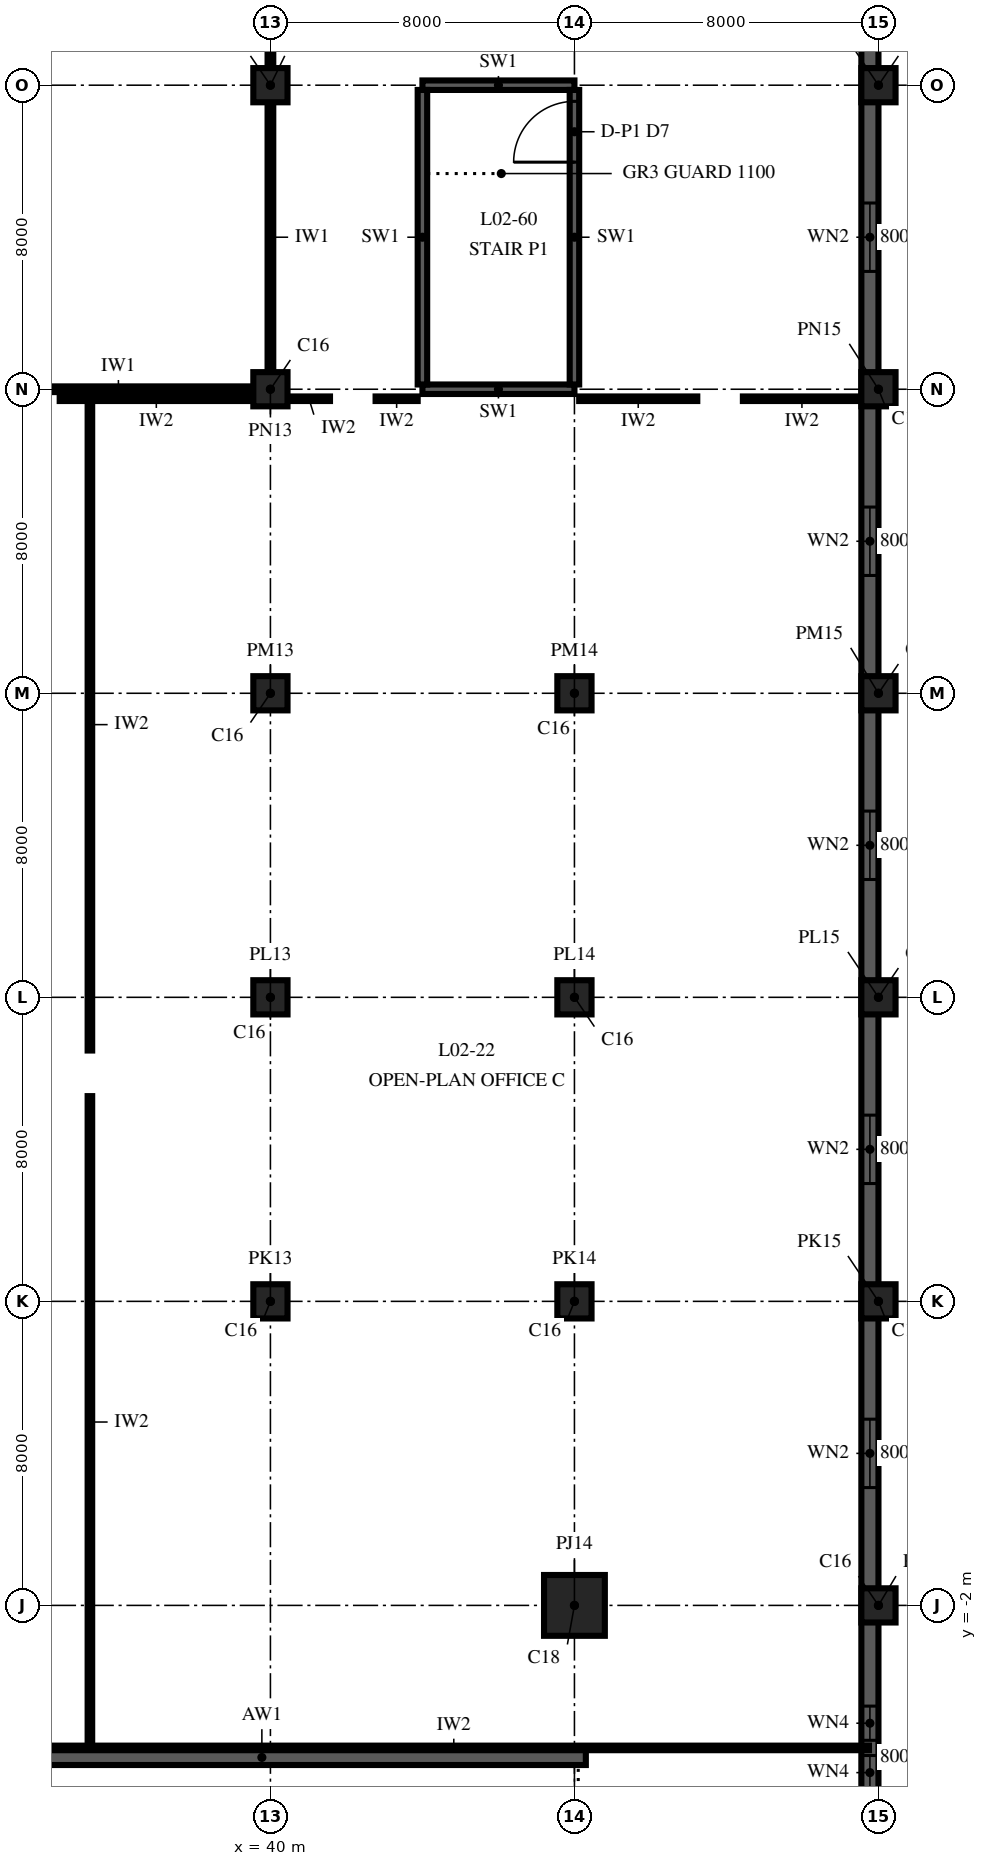
"""IFC4 building model, lengths in metres.
Left out: names, types, materials, properties, quantities, classifications, styles, units other than length and angle.
Written with IfcOpenShell. Run it as: python <this file> out.ifc"""

import sys

from ifc_helpers import new_model, si_unit, direction, frame, frame_2d, origin, origin_2d, place, context, subcontext, project, spatial, rectangle, extrude, element, fill, save


model = new_model("IFC4")
c1 = context("Model", 3, precision=1e-05, world=origin(), true_north=direction((0.0, 1.0)))
c2 = subcontext(c1, "Body", "Model", "MODEL_VIEW")
j1 = project(units=[si_unit("LENGTHUNIT", "METRE"), si_unit("PLANEANGLEUNIT", "RADIAN")], contexts=[c1])
p1 = place(None, origin())
s1 = spatial("IfcSite", under=j1, at=p1, CompositionType="ELEMENT")
p2 = place(p1, origin())
s2 = spatial("IfcBuilding", under=s1, at=p2, CompositionType="ELEMENT")
p3 = place(p2, frame((0.0, 0.0, 12.0)))
s3 = spatial("IfcBuildingStorey", under=s2, at=p3, CompositionType="ELEMENT", Elevation=12.0)
for number, where, z_axis, x_axis in (
    (1, (40.0, 6.0, 0.0), (0.0, 0.0, 1.0), (1.0, 0.0, 0.0)),
    (2, (40.0, 14.0, 0.0), (0.0, 0.0, 1.0), (1.0, 0.0, 0.0)),
    (3, (40.0, 22.0, 0.0), (0.0, 0.0, 1.0), (1.0, 0.0, 0.0)),
    (4, (40.0, 30.0, 0.0), (0.0, 0.0, 1.0), (1.0, 0.0, 0.0)),
    (5, (40.0, 38.0, 0.0), (0.0, 0.0, 1.0), (1.0, 0.0, 0.0)),
):
    element("IfcColumn", number, at=place(p3, frame(where, z_axis=z_axis, x_axis=x_axis)), inside=s3, PredefinedType="COLUMN", context=c2, shape_type="SweptSolid", body=[
        extrude(rectangle(XDim=0.9, YDim=0.9, at=origin_2d()), origin(), (0.0, 0.0, 1.0), 7.0),
    ])
p4 = place(p3, frame((48.0, -2.0, 0.0), z_axis=(0.0, 0.0, 1.0), x_axis=(1.0, 0.0, 0.0)))
e6 = element("IfcColumn", 6, at=p4, inside=s3, PredefinedType="COLUMN", context=c2, shape_type="SweptSolid", body=[
    extrude(rectangle(XDim=1.6, YDim=1.6, at=origin_2d()), origin(), (0.0, 0.0, 1.0), 7.0),
])
for number, where, z_axis, x_axis in (
    (7, (48.0, 6.0, 0.0), (0.0, 0.0, 1.0), (1.0, 0.0, 0.0)),
    (8, (48.0, 14.0, 0.0), (0.0, 0.0, 1.0), (1.0, 0.0, 0.0)),
    (9, (48.0, 22.0, 0.0), (0.0, 0.0, 1.0), (1.0, 0.0, 0.0)),
    (10, (56.0, -2.0, 0.0), (0.0, 0.0, 1.0), (1.0, 0.0, 0.0)),
    (11, (56.0, 6.0, 0.0), (0.0, 0.0, 1.0), (1.0, 0.0, 0.0)),
    (12, (56.0, 14.0, 0.0), (0.0, 0.0, 1.0), (1.0, 0.0, 0.0)),
    (13, (56.0, 22.0, 0.0), (0.0, 0.0, 1.0), (1.0, 0.0, 0.0)),
    (14, (56.0, 30.0, 0.0), (0.0, 0.0, 1.0), (1.0, 0.0, 0.0)),
    (15, (56.0, 38.0, 0.0), (0.0, 0.0, 1.0), (1.0, 0.0, 0.0)),
):
    element("IfcColumn", number, at=place(p3, frame(where, z_axis=z_axis, x_axis=x_axis)), inside=s3, PredefinedType="COLUMN", context=c2, shape_type="SweptSolid", body=[
        extrude(rectangle(XDim=0.9, YDim=0.9, at=origin_2d()), origin(), (0.0, 0.0, 1.0), 7.0),
    ])
p5 = place(p3, frame((31.25, -6.0, 0.0), z_axis=(0.0, 0.0, 1.0), x_axis=(1.0, 0.0, 0.0)))
e16 = element("IfcWall", 16, at=p5, inside=s3, PredefinedType="SHEAR", context=c2, shape_type="SweptSolid", body=[
    extrude(rectangle(XDim=17.05, YDim=0.4, at=frame_2d((8.525, 0.0))), origin(), (0.0, 0.0, 1.0), 7.0),
])
p6 = place(p3, frame((55.775, -73.55, 0.0), z_axis=(0.0, 0.0, 1.0), x_axis=(0.0, 1.0, 0.0)))
e17 = element("IfcWall", 17, at=p6, inside=s3, PredefinedType="SOLIDWALL", context=c2, shape_type="SweptSolid", body=[
    extrude(rectangle(XDim=119.1, YDim=0.45, at=frame_2d((59.55, 0.0))), origin(), (0.0, 0.0, 1.0), 7.0),
])
p7 = place(p6, frame((2.875, 0.0, 1.0)))
e18 = element("IfcOpeningElement", 18, at=p7, cuts=e17, PredefinedType="OPENING", context=c2, shape_type="SweptSolid", body=[
    extrude(rectangle(XDim=1.8, YDim=3.0, at=frame_2d((0.9, 1.5))), frame((0.0, 0.24, 0.0), z_axis=(0.0, -1.0, 0.0), x_axis=(1.0, 0.0, 0.0)), (0.0, 0.0, 1.0), 0.48),
])
p8 = place(p6, frame((10.65, 0.0, 1.0)))
e19 = element("IfcOpeningElement", 19, at=p8, cuts=e17, PredefinedType="OPENING", context=c2, shape_type="SweptSolid", body=[
    extrude(rectangle(XDim=1.8, YDim=3.0, at=frame_2d((0.9, 1.5))), frame((0.0, 0.24, 0.0), z_axis=(0.0, -1.0, 0.0), x_axis=(1.0, 0.0, 0.0)), (0.0, 0.0, 1.0), 0.48),
])
p9 = place(p6, frame((18.65, 0.0, 1.0)))
e20 = element("IfcOpeningElement", 20, at=p9, cuts=e17, PredefinedType="OPENING", context=c2, shape_type="SweptSolid", body=[
    extrude(rectangle(XDim=1.8, YDim=3.0, at=frame_2d((0.9, 1.5))), frame((0.0, 0.24, 0.0), z_axis=(0.0, -1.0, 0.0), x_axis=(1.0, 0.0, 0.0)), (0.0, 0.0, 1.0), 0.48),
])
p10 = place(p6, frame((26.65, 0.0, 1.0)))
e21 = element("IfcOpeningElement", 21, at=p10, cuts=e17, PredefinedType="OPENING", context=c2, shape_type="SweptSolid", body=[
    extrude(rectangle(XDim=1.8, YDim=3.0, at=frame_2d((0.9, 1.5))), frame((0.0, 0.24, 0.0), z_axis=(0.0, -1.0, 0.0), x_axis=(1.0, 0.0, 0.0)), (0.0, 0.0, 1.0), 0.48),
])
p11 = place(p6, frame((34.65, 0.0, 1.0)))
e22 = element("IfcOpeningElement", 22, at=p11, cuts=e17, PredefinedType="OPENING", context=c2, shape_type="SweptSolid", body=[
    extrude(rectangle(XDim=1.8, YDim=3.0, at=frame_2d((0.9, 1.5))), frame((0.0, 0.24, 0.0), z_axis=(0.0, -1.0, 0.0), x_axis=(1.0, 0.0, 0.0)), (0.0, 0.0, 1.0), 0.48),
])
p12 = place(p6, frame((42.65, 0.0, 1.0)))
e23 = element("IfcOpeningElement", 23, at=p12, cuts=e17, PredefinedType="OPENING", context=c2, shape_type="SweptSolid", body=[
    extrude(rectangle(XDim=1.8, YDim=3.0, at=frame_2d((0.9, 1.5))), frame((0.0, 0.24, 0.0), z_axis=(0.0, -1.0, 0.0), x_axis=(1.0, 0.0, 0.0)), (0.0, 0.0, 1.0), 0.48),
])
p13 = place(p6, frame((50.65, 0.0, 1.0)))
e24 = element("IfcOpeningElement", 24, at=p13, cuts=e17, PredefinedType="OPENING", context=c2, shape_type="SweptSolid", body=[
    extrude(rectangle(XDim=1.8, YDim=3.0, at=frame_2d((0.9, 1.5))), frame((0.0, 0.24, 0.0), z_axis=(0.0, -1.0, 0.0), x_axis=(1.0, 0.0, 0.0)), (0.0, 0.0, 1.0), 0.48),
])
p14 = place(p6, frame((58.45, 0.0, 1.0)))
e25 = element("IfcOpeningElement", 25, at=p14, cuts=e17, PredefinedType="OPENING", context=c2, shape_type="SweptSolid", body=[
    extrude(rectangle(XDim=0.9, YDim=3.0, at=frame_2d((0.45, 1.5))), frame((0.0, 0.24, 0.0), z_axis=(0.0, -1.0, 0.0), x_axis=(1.0, 0.0, 0.0)), (0.0, 0.0, 1.0), 0.48),
])
p15 = place(p6, frame((59.75, 0.0, 1.0)))
e26 = element("IfcOpeningElement", 26, at=p15, cuts=e17, PredefinedType="OPENING", context=c2, shape_type="SweptSolid", body=[
    extrude(rectangle(XDim=0.9, YDim=3.0, at=frame_2d((0.45, 1.5))), frame((0.0, 0.24, 0.0), z_axis=(0.0, -1.0, 0.0), x_axis=(1.0, 0.0, 0.0)), (0.0, 0.0, 1.0), 0.48),
])
p16 = place(p6, frame((66.7, 0.0, 1.0)))
e27 = element("IfcOpeningElement", 27, at=p16, cuts=e17, PredefinedType="OPENING", context=c2, shape_type="SweptSolid", body=[
    extrude(rectangle(XDim=0.9, YDim=3.0, at=frame_2d((0.45, 1.5))), frame((0.0, 0.24, 0.0), z_axis=(0.0, -1.0, 0.0), x_axis=(1.0, 0.0, 0.0)), (0.0, 0.0, 1.0), 0.48),
])
p17 = place(p6, frame((68.0, 0.0, 1.0)))
e28 = element("IfcOpeningElement", 28, at=p17, cuts=e17, PredefinedType="OPENING", context=c2, shape_type="SweptSolid", body=[
    extrude(rectangle(XDim=0.9, YDim=3.0, at=frame_2d((0.45, 1.5))), frame((0.0, 0.24, 0.0), z_axis=(0.0, -1.0, 0.0), x_axis=(1.0, 0.0, 0.0)), (0.0, 0.0, 1.0), 0.48),
])
p18 = place(p6, frame((74.65, 0.0, 1.0)))
e29 = element("IfcOpeningElement", 29, at=p18, cuts=e17, PredefinedType="OPENING", context=c2, shape_type="SweptSolid", body=[
    extrude(rectangle(XDim=1.8, YDim=3.0, at=frame_2d((0.9, 1.5))), frame((0.0, 0.24, 0.0), z_axis=(0.0, -1.0, 0.0), x_axis=(1.0, 0.0, 0.0)), (0.0, 0.0, 1.0), 0.48),
])
p19 = place(p6, frame((82.65, 0.0, 1.0)))
e30 = element("IfcOpeningElement", 30, at=p19, cuts=e17, PredefinedType="OPENING", context=c2, shape_type="SweptSolid", body=[
    extrude(rectangle(XDim=1.8, YDim=3.0, at=frame_2d((0.9, 1.5))), frame((0.0, 0.24, 0.0), z_axis=(0.0, -1.0, 0.0), x_axis=(1.0, 0.0, 0.0)), (0.0, 0.0, 1.0), 0.48),
])
p20 = place(p6, frame((90.65, 0.0, 1.0)))
e31 = element("IfcOpeningElement", 31, at=p20, cuts=e17, PredefinedType="OPENING", context=c2, shape_type="SweptSolid", body=[
    extrude(rectangle(XDim=1.8, YDim=3.0, at=frame_2d((0.9, 1.5))), frame((0.0, 0.24, 0.0), z_axis=(0.0, -1.0, 0.0), x_axis=(1.0, 0.0, 0.0)), (0.0, 0.0, 1.0), 0.48),
])
p21 = place(p6, frame((98.65, 0.0, 1.0)))
e32 = element("IfcOpeningElement", 32, at=p21, cuts=e17, PredefinedType="OPENING", context=c2, shape_type="SweptSolid", body=[
    extrude(rectangle(XDim=1.8, YDim=3.0, at=frame_2d((0.9, 1.5))), frame((0.0, 0.24, 0.0), z_axis=(0.0, -1.0, 0.0), x_axis=(1.0, 0.0, 0.0)), (0.0, 0.0, 1.0), 0.48),
])
p22 = place(p6, frame((106.65, 0.0, 1.0)))
e33 = element("IfcOpeningElement", 33, at=p22, cuts=e17, PredefinedType="OPENING", context=c2, shape_type="SweptSolid", body=[
    extrude(rectangle(XDim=1.8, YDim=3.0, at=frame_2d((0.9, 1.5))), frame((0.0, 0.24, 0.0), z_axis=(0.0, -1.0, 0.0), x_axis=(1.0, 0.0, 0.0)), (0.0, 0.0, 1.0), 0.48),
])
p23 = place(p6, frame((114.425, 0.0, 1.0)))
e34 = element("IfcOpeningElement", 34, at=p23, cuts=e17, PredefinedType="OPENING", context=c2, shape_type="SweptSolid", body=[
    extrude(rectangle(XDim=1.8, YDim=3.0, at=frame_2d((0.9, 1.5))), frame((0.0, 0.24, 0.0), z_axis=(0.0, -1.0, 0.0), x_axis=(1.0, 0.0, 0.0)), (0.0, 0.0, 1.0), 0.48),
])
for number, where, z_axis, x_axis in (
    (35, (44.0, 30.0, 0.0), (0.0, 0.0, 1.0), (1.0, 0.0, 0.0)),
    (36, (48.0, 38.0, 0.0), (0.0, 0.0, 1.0), (-1.0, 0.0, 0.0)),
):
    element("IfcWall", number, at=place(p3, frame(where, z_axis=z_axis, x_axis=x_axis)), inside=s3, PredefinedType="SOLIDWALL", context=c2, shape_type="SweptSolid", body=[
        extrude(rectangle(XDim=4.0, YDim=0.25, at=frame_2d((2.0, 0.0))), origin(), (0.0, 0.0, 1.0), 7.0),
    ])
p24 = place(p3, frame((48.0, 30.125, 0.0), z_axis=(0.0, 0.0, 1.0), x_axis=(0.0, 1.0, 0.0)))
e37 = element("IfcWall", 37, at=p24, inside=s3, PredefinedType="SOLIDWALL", context=c2, shape_type="SweptSolid", body=[
    extrude(rectangle(XDim=7.75, YDim=0.25, at=frame_2d((3.875, 0.0))), origin(), (0.0, 0.0, 1.0), 7.0),
])
p25 = place(p24, frame((5.85, 0.0, 0.0)))
e38 = element("IfcOpeningElement", 38, at=p25, cuts=e37, PredefinedType="OPENING", context=c2, shape_type="SweptSolid", body=[
    extrude(rectangle(XDim=1.6, YDim=2.1, at=frame_2d((0.8, 1.05))), frame((0.0, 0.14, 0.0), z_axis=(0.0, -1.0, 0.0), x_axis=(1.0, 0.0, 0.0)), (0.0, 0.0, 1.0), 0.28),
])
p26 = place(p3, frame((44.0, 37.875, 0.0), z_axis=(0.0, 0.0, 1.0), x_axis=(0.0, -1.0, 0.0)))
e39 = element("IfcWall", 39, at=p26, inside=s3, PredefinedType="SOLIDWALL", context=c2, shape_type="SweptSolid", body=[
    extrude(rectangle(XDim=7.75, YDim=0.25, at=frame_2d((3.875, 0.0))), origin(), (0.0, 0.0, 1.0), 7.0),
])
for number, where, z_axis, x_axis in (
    (40, (35.25, -5.75, 0.0), (0.0, 0.0, 1.0), (0.0, 1.0, 0.0)),
    (41, (35.25, 12.6, 0.0), (0.0, 0.0, 1.0), (0.0, 1.0, 0.0)),
):
    element("IfcWall", number, at=place(p3, frame(where, z_axis=z_axis, x_axis=x_axis)), inside=s3, PredefinedType="PARTITIONING", context=c2, shape_type="SweptSolid", body=[
        extrude(rectangle(XDim=17.15, YDim=0.12, at=frame_2d((8.575, 0.0))), origin(), (0.0, 0.0, 1.0), 6.7),
    ])
for number, where, z_axis, x_axis in (
    (42, (40.0, 30.46, 0.0), (0.0, 0.0, 1.0), (0.0, 1.0, 0.0)),
    (43, (40.0, 38.46, 0.0), (0.0, 0.0, 1.0), (0.0, 1.0, 0.0)),
):
    element("IfcWall", number, at=place(p3, frame(where, z_axis=z_axis, x_axis=x_axis)), inside=s3, PredefinedType="PARTITIONING", context=c2, shape_type="SweptSolid", body=[
        extrude(rectangle(XDim=7.08, YDim=0.15, at=frame_2d((3.54, 0.0))), origin(), (0.0, 0.0, 1.0), 6.05),
    ])
p27 = place(p3, frame((33.9, -5.75, 0.0), z_axis=(0.0, 0.0, 1.0), x_axis=(1.0, 0.0, 0.0)))
e44 = element("IfcWall", 44, at=p27, inside=s3, PredefinedType="PARTITIONING", context=c2, shape_type="SweptSolid", body=[
    extrude(rectangle(XDim=21.85, YDim=0.12, at=frame_2d((10.925, 0.0))), origin(), (0.0, 0.0, 1.0), 6.7),
])
p28 = place(p3, frame((34.455, 29.75, 0.0), z_axis=(0.0, 0.0, 1.0), x_axis=(1.0, 0.0, 0.0)))
e45 = element("IfcWall", 45, at=p28, inside=s3, PredefinedType="PARTITIONING", context=c2, shape_type="SweptSolid", body=[
    extrude(rectangle(XDim=5.085, YDim=0.12, at=frame_2d((2.542, 0.0))), origin(), (0.0, 0.0, 1.0), 6.05),
])
for number, where, z_axis, x_axis in (
    (46, (40.46, 29.75, 0.0), (0.0, 0.0, 1.0), (1.0, 0.0, 0.0)),
    (47, (42.768, 29.75, 0.0), (0.0, 0.0, 1.0), (1.0, 0.0, 0.0)),
):
    element("IfcWall", number, at=place(p3, frame(where, z_axis=z_axis, x_axis=x_axis)), inside=s3, PredefinedType="PARTITIONING", context=c2, shape_type="SweptSolid", body=[
        extrude(rectangle(XDim=1.107, YDim=0.12, at=frame_2d((0.554, 0.0))), origin(), (0.0, 0.0, 1.0), 6.7),
    ])
for number, where, z_axis, x_axis in (
    (48, (48.125, 29.75, 0.0), (0.0, 0.0, 1.0), (1.0, 0.0, 0.0)),
    (49, (52.433, 29.75, 0.0), (0.0, 0.0, 1.0), (1.0, 0.0, 0.0)),
):
    element("IfcWall", number, at=place(p3, frame(where, z_axis=z_axis, x_axis=x_axis)), inside=s3, PredefinedType="PARTITIONING", context=c2, shape_type="SweptSolid", body=[
        extrude(rectangle(XDim=3.107, YDim=0.12, at=frame_2d((1.554, 0.0))), origin(), (0.0, 0.0, 1.0), 6.7),
    ])
p29 = place(p3, frame((32.46, 30.0, 0.0), z_axis=(0.0, 0.0, 1.0), x_axis=(1.0, 0.0, 0.0)))
e50 = element("IfcWall", 50, at=p29, inside=s3, PredefinedType="PARTITIONING", context=c2, shape_type="SweptSolid", body=[
    extrude(rectangle(XDim=7.08, YDim=0.15, at=frame_2d((3.54, 0.0))), origin(), (0.0, 0.0, 1.0), 6.05),
])
p30 = place(p16, origin())
e51 = element("IfcWindow", 51, at=p30, inside=s3, PartitioningType="SINGLE_PANEL", PredefinedType="WINDOW", context=c2, shape_type="SweptSolid", body=[
    extrude(rectangle(XDim=0.9, YDim=3.0, at=frame_2d((0.45, 1.5))), frame((0.0, 0.03, 0.0), z_axis=(0.0, -1.0, 0.0), x_axis=(1.0, 0.0, 0.0)), (0.0, 0.0, 1.0), 0.06),
])
fill(e27, e51)
p31 = place(p17, origin())
e52 = element("IfcWindow", 52, at=p31, inside=s3, PartitioningType="SINGLE_PANEL", PredefinedType="WINDOW", context=c2, shape_type="SweptSolid", body=[
    extrude(rectangle(XDim=0.9, YDim=3.0, at=frame_2d((0.45, 1.5))), frame((0.0, 0.03, 0.0), z_axis=(0.0, -1.0, 0.0), x_axis=(1.0, 0.0, 0.0)), (0.0, 0.0, 1.0), 0.06),
])
fill(e28, e52)
p32 = place(p18, origin())
e53 = element("IfcWindow", 53, at=p32, inside=s3, PartitioningType="SINGLE_PANEL", PredefinedType="WINDOW", context=c2, shape_type="SweptSolid", body=[
    extrude(rectangle(XDim=1.8, YDim=3.0, at=frame_2d((0.9, 1.5))), frame((0.0, 0.03, 0.0), z_axis=(0.0, -1.0, 0.0), x_axis=(1.0, 0.0, 0.0)), (0.0, 0.0, 1.0), 0.06),
])
fill(e29, e53)
p33 = place(p19, origin())
e54 = element("IfcWindow", 54, at=p33, inside=s3, PartitioningType="SINGLE_PANEL", PredefinedType="WINDOW", context=c2, shape_type="SweptSolid", body=[
    extrude(rectangle(XDim=1.8, YDim=3.0, at=frame_2d((0.9, 1.5))), frame((0.0, 0.03, 0.0), z_axis=(0.0, -1.0, 0.0), x_axis=(1.0, 0.0, 0.0)), (0.0, 0.0, 1.0), 0.06),
])
fill(e30, e54)
p34 = place(p20, origin())
e55 = element("IfcWindow", 55, at=p34, inside=s3, PartitioningType="SINGLE_PANEL", PredefinedType="WINDOW", context=c2, shape_type="SweptSolid", body=[
    extrude(rectangle(XDim=1.8, YDim=3.0, at=frame_2d((0.9, 1.5))), frame((0.0, 0.03, 0.0), z_axis=(0.0, -1.0, 0.0), x_axis=(1.0, 0.0, 0.0)), (0.0, 0.0, 1.0), 0.06),
])
fill(e31, e55)
p35 = place(p21, origin())
e56 = element("IfcWindow", 56, at=p35, inside=s3, PartitioningType="SINGLE_PANEL", PredefinedType="WINDOW", context=c2, shape_type="SweptSolid", body=[
    extrude(rectangle(XDim=1.8, YDim=3.0, at=frame_2d((0.9, 1.5))), frame((0.0, 0.03, 0.0), z_axis=(0.0, -1.0, 0.0), x_axis=(1.0, 0.0, 0.0)), (0.0, 0.0, 1.0), 0.06),
])
fill(e32, e56)
p36 = place(p22, origin())
e57 = element("IfcWindow", 57, at=p36, inside=s3, PartitioningType="SINGLE_PANEL", PredefinedType="WINDOW", context=c2, shape_type="SweptSolid", body=[
    extrude(rectangle(XDim=1.8, YDim=3.0, at=frame_2d((0.9, 1.5))), frame((0.0, 0.03, 0.0), z_axis=(0.0, -1.0, 0.0), x_axis=(1.0, 0.0, 0.0)), (0.0, 0.0, 1.0), 0.06),
])
fill(e33, e57)
p37 = place(p25, origin())
e58 = element("IfcDoor", 58, at=p37, inside=s3, OperationType="DOUBLE_DOOR_SINGLE_SWING", PredefinedType="DOOR", context=c2, shape_type="SweptSolid", body=[
    extrude(rectangle(XDim=1.6, YDim=2.1, at=frame_2d((0.8, 1.05))), frame((0.0, 0.125, 0.0), z_axis=(0.0, -1.0, 0.0), x_axis=(1.0, 0.0, 0.0)), (0.0, 0.0, 1.0), 0.25),
])
fill(e38, e58)
save(model, sys.argv[1])
